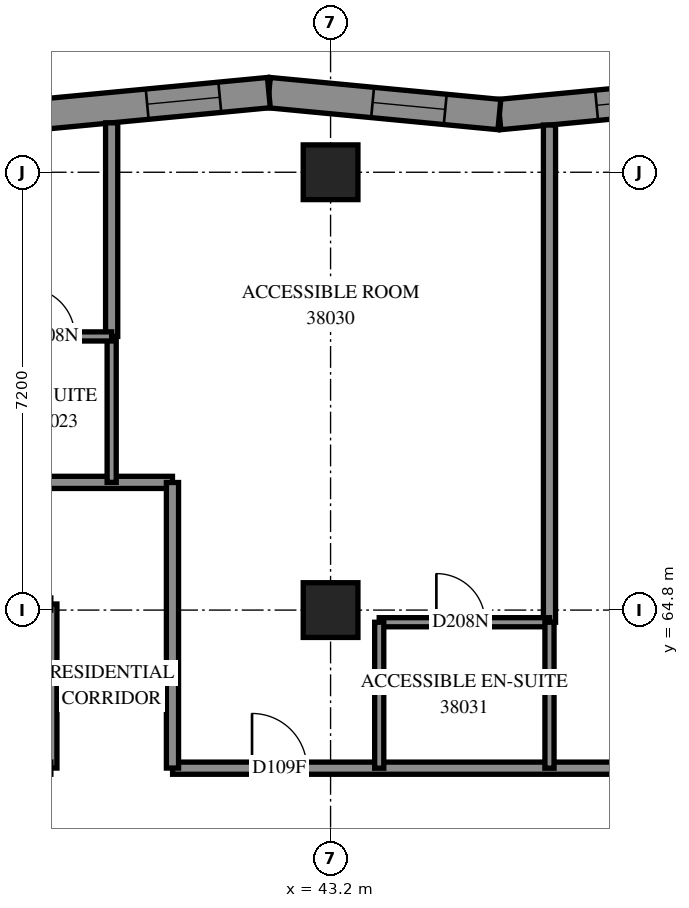
"""IFC4 building model, lengths in metres.
Left out: names, types, materials, properties, quantities, classifications, styles, units other than length and angle.
Written with IfcOpenShell. Run it as: python <this file> out.ifc"""

import sys

from ifc_helpers import new_model, si_unit, direction, frame, frame_2d, origin, origin_2d, place, context, subcontext, project, spatial, polyline, rectangle, outline, extrude, element, fill, save


model = new_model("IFC4")
c1 = context("Model", 3, precision=1e-05, world=origin(), true_north=direction((0.0, 1.0)))
c2 = subcontext(c1, "Body", "Model", "MODEL_VIEW")
j1 = project(units=[si_unit("LENGTHUNIT", "METRE"), si_unit("PLANEANGLEUNIT", "RADIAN")], contexts=[c1])
p1 = place(None, origin())
s1 = spatial("IfcSite", under=j1, at=p1, CompositionType="ELEMENT")
p2 = place(p1, origin())
s2 = spatial("IfcBuilding", under=s1, at=p2, CompositionType="ELEMENT")
p3 = place(p2, frame((0.0, 0.0, 142.2)))
s3 = spatial("IfcBuildingStorey", under=s2, at=p3, CompositionType="ELEMENT", Elevation=142.2)
for number, where, z_axis, x_axis in (
    (1, (43.2, 64.8, 0.0), (0.0, 0.0, 1.0), (1.0, 0.0, 0.0)),
    (2, (43.2, 72.0, 0.0), (0.0, 0.0, 1.0), (1.0, 0.0, 0.0)),
):
    element("IfcColumn", number, at=place(p3, frame(where, z_axis=z_axis, x_axis=x_axis)), inside=s3, PredefinedType="COLUMN", context=c2, shape_type="SweptSolid", body=[
        extrude(rectangle(XDim=0.9, YDim=0.9, at=origin_2d()), origin(), (0.0, 0.0, 1.0), 3.1),
    ])
p4 = place(p3, frame((49.767, 73.31, 0.0), z_axis=(0.0, 0.0, 1.0), x_axis=(-0.9954966527, -0.0947967005, 0.0)))
e3 = element("IfcWall", 3, at=p4, inside=s3, PredefinedType="SOLIDWALL", context=c2, shape_type="SweptSolid", body=[
    extrude(outline(polyline([(-0.024, -0.25), (3.784, -0.25), (3.832, 0.25), (0.024, 0.25), (-0.024, -0.25)])), origin(), (0.0, 0.0, 1.0), 3.1),
])
p5 = place(p4, frame((1.002, 0.0, 0.45)))
e4 = element("IfcOpeningElement", 4, at=p5, cuts=e3, PredefinedType="OPENING", context=c2, shape_type="SweptSolid", body=[
    extrude(rectangle(XDim=1.2, YDim=2.5, at=frame_2d((0.6, 1.25))), frame((0.0, 0.26, 0.0), z_axis=(0.0, -1.0, 0.0), x_axis=(1.0, 0.0, 0.0)), (0.0, 0.0, 1.0), 0.52),
])
p6 = place(p3, frame((45.976, 72.949, 0.0), z_axis=(0.0, 0.0, 1.0), x_axis=(-0.9954966527, 0.0947967005, 0.0)))
e5 = element("IfcWall", 5, at=p6, inside=s3, PredefinedType="SOLIDWALL", context=c2, shape_type="SweptSolid", body=[
    extrude(outline(polyline([(0.024, -0.25), (3.832, -0.25), (3.784, 0.25), (-0.024, 0.25), (0.024, -0.25)])), origin(), (0.0, 0.0, 1.0), 3.1),
])
p7 = place(p6, frame((0.894, 0.0, 0.45)))
e6 = element("IfcOpeningElement", 6, at=p7, cuts=e5, PredefinedType="OPENING", context=c2, shape_type="SweptSolid", body=[
    extrude(rectangle(XDim=1.2, YDim=2.5, at=frame_2d((0.6, 1.25))), frame((0.0, 0.26, 0.0), z_axis=(0.0, -1.0, 0.0), x_axis=(1.0, 0.0, 0.0)), (0.0, 0.0, 1.0), 0.52),
])
p8 = place(p3, frame((42.185, 73.31, 0.0), z_axis=(0.0, 0.0, 1.0), x_axis=(-0.9954968887, -0.0947942225, 0.0)))
e7 = element("IfcWall", 7, at=p8, inside=s3, PredefinedType="SOLIDWALL", context=c2, shape_type="SweptSolid", body=[
    extrude(outline(polyline([(-0.024, -0.25), (3.784, -0.25), (3.832, 0.25), (0.024, 0.25), (-0.024, -0.25)])), origin(), (0.0, 0.0, 1.0), 3.1),
])
p9 = place(p8, frame((0.81, 0.0, 0.45)))
e8 = element("IfcOpeningElement", 8, at=p9, cuts=e7, PredefinedType="OPENING", context=c2, shape_type="SweptSolid", body=[
    extrude(rectangle(XDim=1.2, YDim=2.5, at=frame_2d((0.6, 1.25))), frame((0.0, 0.26, 0.0), z_axis=(0.0, -1.0, 0.0), x_axis=(1.0, 0.0, 0.0)), (0.0, 0.0, 1.0), 0.52),
])
p10 = place(p3, frame((21.6, 66.9, 0.0), z_axis=(0.0, 0.0, 1.0), x_axis=(1.0, 0.0, 0.0)))
e9 = element("IfcWall", 9, at=p10, inside=s3, PredefinedType="PARTITIONING", context=c2, shape_type="SweptSolid", body=[
    extrude(rectangle(XDim=19.0, YDim=0.2, at=frame_2d((9.5, 0.0))), origin(), (0.0, 0.0, 1.0), 3.1),
])
p11 = place(p10, frame((2.3, 0.0, 0.0)))
e10 = element("IfcOpeningElement", 10, at=p11, cuts=e9, PredefinedType="OPENING", context=c2, shape_type="SweptSolid", body=[
    extrude(rectangle(XDim=0.9, YDim=2.1, at=frame_2d((0.45, 1.05))), frame((0.0, 0.11, 0.0), z_axis=(0.0, -1.0, 0.0), x_axis=(1.0, 0.0, 0.0)), (0.0, 0.0, 1.0), 0.22),
])
p12 = place(p10, frame((5.957, 0.0, 0.0)))
e11 = element("IfcOpeningElement", 11, at=p12, cuts=e9, PredefinedType="OPENING", context=c2, shape_type="SweptSolid", body=[
    extrude(rectangle(XDim=0.9, YDim=2.1, at=frame_2d((0.45, 1.05))), frame((0.0, 0.11, 0.0), z_axis=(0.0, -1.0, 0.0), x_axis=(1.0, 0.0, 0.0)), (0.0, 0.0, 1.0), 0.22),
])
p13 = place(p10, frame((13.057, 0.0, 0.0)))
e12 = element("IfcOpeningElement", 12, at=p13, cuts=e9, PredefinedType="OPENING", context=c2, shape_type="SweptSolid", body=[
    extrude(rectangle(XDim=0.9, YDim=2.1, at=frame_2d((0.45, 1.05))), frame((0.0, 0.11, 0.0), z_axis=(0.0, -1.0, 0.0), x_axis=(1.0, 0.0, 0.0)), (0.0, 0.0, 1.0), 0.22),
])
p14 = place(p3, frame((40.602, 62.2, 0.0), z_axis=(0.0, 0.0, 1.0), x_axis=(1.0, 0.0, 0.0)))
e13 = element("IfcWall", 13, at=p14, inside=s3, PredefinedType="PARTITIONING", context=c2, shape_type="SweptSolid", body=[
    extrude(rectangle(XDim=14.298, YDim=0.2, at=frame_2d((7.149, 0.0))), origin(), (0.0, 0.0, 1.0), 3.1),
])
p15 = place(p14, frame((1.306, 0.0, 0.0)))
e14 = element("IfcOpeningElement", 14, at=p15, cuts=e13, PredefinedType="OPENING", context=c2, shape_type="SweptSolid", body=[
    extrude(rectangle(XDim=0.9, YDim=2.1, at=frame_2d((0.45, 1.05))), frame((0.0, 0.11, 0.0), z_axis=(0.0, -1.0, 0.0), x_axis=(1.0, 0.0, 0.0)), (0.0, 0.0, 1.0), 0.22),
])
p16 = place(p14, frame((8.455, 0.0, 0.0)))
e15 = element("IfcOpeningElement", 15, at=p16, cuts=e13, PredefinedType="OPENING", context=c2, shape_type="SweptSolid", body=[
    extrude(rectangle(XDim=0.9, YDim=2.1, at=frame_2d((0.45, 1.05))), frame((0.0, 0.11, 0.0), z_axis=(0.0, -1.0, 0.0), x_axis=(1.0, 0.0, 0.0)), (0.0, 0.0, 1.0), 0.22),
])
p17 = place(p3, frame((46.8, 64.6, 0.0), z_axis=(0.0, 0.0, 1.0), x_axis=(0.0, 1.0, 0.0)))
e16 = element("IfcWall", 16, at=p17, inside=s3, PredefinedType="PARTITIONING", context=c2, shape_type="SweptSolid", body=[
    extrude(rectangle(XDim=8.176, YDim=0.2, at=frame_2d((4.088, 0.0))), origin(), (0.0, 0.0, 1.0), 3.1),
])
p18 = place(p3, frame((40.6, 62.202, 0.0), z_axis=(0.0, 0.0, 1.0), x_axis=(0.0, 1.0, 0.0)))
e17 = element("IfcWall", 17, at=p18, inside=s3, PredefinedType="PARTITIONING", context=c2, shape_type="SweptSolid", body=[
    extrude(rectangle(XDim=4.696, YDim=0.2, at=frame_2d((2.348, 0.0))), origin(), (0.0, 0.0, 1.0), 3.1),
])
p19 = place(p3, frame((39.6, 69.3, 0.0), z_axis=(0.0, 0.0, 1.0), x_axis=(0.0, 1.0, 0.0)))
e18 = element("IfcWall", 18, at=p19, inside=s3, PredefinedType="PARTITIONING", context=c2, shape_type="SweptSolid", body=[
    extrude(rectangle(XDim=3.513, YDim=0.2, at=frame_2d((1.756, 0.0))), origin(), (0.0, 0.0, 1.0), 3.1),
])
p20 = place(p3, frame((44.0, 64.6, 0.0), z_axis=(0.0, 0.0, 1.0), x_axis=(1.0, 0.0, 0.0)))
e19 = element("IfcWall", 19, at=p20, inside=s3, PredefinedType="PARTITIONING", context=c2, shape_type="SweptSolid", body=[
    extrude(rectangle(XDim=2.8, YDim=0.15, at=frame_2d((1.4, 0.0))), origin(), (0.0, 0.0, 1.0), 3.1),
])
p21 = place(p20, frame((0.94, 0.0, 0.0)))
e20 = element("IfcOpeningElement", 20, at=p21, cuts=e19, PredefinedType="OPENING", context=c2, shape_type="SweptSolid", body=[
    extrude(rectangle(XDim=0.8, YDim=2.1, at=frame_2d((0.4, 1.05))), frame((0.0, 0.085, 0.0), z_axis=(0.0, -1.0, 0.0), x_axis=(1.0, 0.0, 0.0)), (0.0, 0.0, 1.0), 0.17),
])
p22 = place(p3, frame((38.6, 62.202, 0.0), z_axis=(0.0, 0.0, 1.0), x_axis=(0.0, 1.0, 0.0)))
e21 = element("IfcWall", 21, at=p22, inside=s3, PredefinedType="PARTITIONING", context=c2, shape_type="SweptSolid", body=[
    extrude(rectangle(XDim=2.698, YDim=0.2, at=frame_2d((1.349, 0.0))), origin(), (0.0, 0.0, 1.0), 3.1),
])
for number, where, z_axis, x_axis in (
    (22, (39.6, 66.9, 0.0), (0.0, 0.0, 1.0), (0.0, 1.0, 0.0)),
    (23, (44.0, 62.2, 0.0), (0.0, 0.0, 1.0), (0.0, 1.0, 0.0)),
    (24, (46.8, 62.2, 0.0), (0.0, 0.0, 1.0), (0.0, 1.0, 0.0)),
):
    element("IfcWall", number, at=place(p3, frame(where, z_axis=z_axis, x_axis=x_axis)), inside=s3, PredefinedType="PARTITIONING", context=c2, shape_type="SweptSolid", body=[
        extrude(rectangle(XDim=2.4, YDim=0.15, at=frame_2d((1.2, 0.0))), origin(), (0.0, 0.0, 1.0), 3.1),
    ])
p23 = place(p3, frame((37.7, 69.3, 0.0), z_axis=(0.0, 0.0, 1.0), x_axis=(1.0, 0.0, 0.0)))
e25 = element("IfcWall", 25, at=p23, inside=s3, PredefinedType="PARTITIONING", context=c2, shape_type="SweptSolid", body=[
    extrude(rectangle(XDim=1.9, YDim=0.15, at=frame_2d((0.95, 0.0))), origin(), (0.0, 0.0, 1.0), 3.1),
])
p24 = place(p23, frame((0.493, 0.0, 0.0)))
e26 = element("IfcOpeningElement", 26, at=p24, cuts=e25, PredefinedType="OPENING", context=c2, shape_type="SweptSolid", body=[
    extrude(rectangle(XDim=0.8, YDim=2.1, at=frame_2d((0.4, 1.05))), frame((0.0, 0.085, 0.0), z_axis=(0.0, -1.0, 0.0), x_axis=(1.0, 0.0, 0.0)), (0.0, 0.0, 1.0), 0.17),
])
p25 = place(p5, origin())
e27 = element("IfcWindow", 27, at=p25, inside=s3, PartitioningType="SINGLE_PANEL", PredefinedType="WINDOW", context=c2, shape_type="SweptSolid", body=[
    extrude(rectangle(XDim=1.2, YDim=2.5, at=frame_2d((0.6, 1.25))), frame((0.0, 0.18, 0.0), z_axis=(0.0, -1.0, 0.0), x_axis=(1.0, 0.0, 0.0)), (0.0, 0.0, 1.0), 0.06),
])
fill(e4, e27)
p26 = place(p7, origin())
e28 = element("IfcWindow", 28, at=p26, inside=s3, PartitioningType="SINGLE_PANEL", PredefinedType="WINDOW", context=c2, shape_type="SweptSolid", body=[
    extrude(rectangle(XDim=1.2, YDim=2.5, at=frame_2d((0.6, 1.25))), frame((0.0, 0.18, 0.0), z_axis=(0.0, -1.0, 0.0), x_axis=(1.0, 0.0, 0.0)), (0.0, 0.0, 1.0), 0.06),
])
fill(e6, e28)
p27 = place(p9, origin())
e29 = element("IfcWindow", 29, at=p27, inside=s3, PartitioningType="SINGLE_PANEL", PredefinedType="WINDOW", context=c2, shape_type="SweptSolid", body=[
    extrude(rectangle(XDim=1.2, YDim=2.5, at=frame_2d((0.6, 1.25))), frame((0.0, 0.18, 0.0), z_axis=(0.0, -1.0, 0.0), x_axis=(1.0, 0.0, 0.0)), (0.0, 0.0, 1.0), 0.06),
])
fill(e8, e29)
p28 = place(p24, origin())
e30 = element("IfcDoor", 30, at=p28, inside=s3, OperationType="SINGLE_SWING_RIGHT", PredefinedType="DOOR", context=c2, shape_type="SweptSolid", body=[
    extrude(rectangle(XDim=0.8, YDim=2.1, at=frame_2d((0.4, 1.05))), frame((0.0, 0.025, 0.0), z_axis=(0.0, -1.0, 0.0), x_axis=(1.0, 0.0, 0.0)), (0.0, 0.0, 1.0), 0.05),
])
fill(e26, e30)
p29 = place(p15, origin())
e31 = element("IfcDoor", 31, at=p29, inside=s3, OperationType="SINGLE_SWING_LEFT", PredefinedType="DOOR", context=c2, shape_type="SweptSolid", body=[
    extrude(rectangle(XDim=0.9, YDim=2.1, at=frame_2d((0.45, 1.05))), frame((0.0, 0.025, 0.0), z_axis=(0.0, -1.0, 0.0), x_axis=(1.0, 0.0, 0.0)), (0.0, 0.0, 1.0), 0.05),
])
fill(e14, e31)
p30 = place(p21, origin())
e32 = element("IfcDoor", 32, at=p30, inside=s3, OperationType="SINGLE_SWING_RIGHT", PredefinedType="DOOR", context=c2, shape_type="SweptSolid", body=[
    extrude(rectangle(XDim=0.8, YDim=2.1, at=frame_2d((0.4, 1.05))), frame((0.0, 0.025, 0.0), z_axis=(0.0, -1.0, 0.0), x_axis=(1.0, 0.0, 0.0)), (0.0, 0.0, 1.0), 0.05),
])
fill(e20, e32)
save(model, sys.argv[1])
